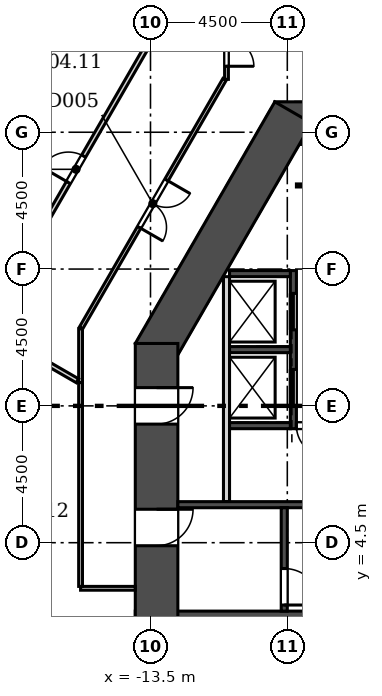
"""IFC4 building model, lengths in metres.
Left out: names, types, materials, properties, quantities, classifications, styles, units other than length and angle.
Written with IfcOpenShell. Run it as: python <this file> out.ifc"""

import sys

from ifc_helpers import new_model, si_unit, direction, frame, frame_2d, origin, place, context, subcontext, project, spatial, rectangle, extrude, element, fill, save


model = new_model("IFC4")
c1 = context("Model", 3, precision=1e-05, world=origin(), true_north=direction((0.0, 1.0)))
c2 = subcontext(c1, "Body", "Model", "MODEL_VIEW")
j1 = project(units=[si_unit("LENGTHUNIT", "METRE"), si_unit("PLANEANGLEUNIT", "RADIAN")], contexts=[c1])
p1 = place(None, origin())
s1 = spatial("IfcSite", under=j1, at=p1, CompositionType="ELEMENT")
p2 = place(p1, origin())
s2 = spatial("IfcBuilding", under=s1, at=p2, CompositionType="ELEMENT")
p3 = place(p2, frame((0.0, 0.0, 25.0)))
s3 = spatial("IfcBuildingStorey", under=s2, at=p3, CompositionType="ELEMENT", Elevation=25.0)
p4 = place(p3, frame((-14.0, 1.55, 0.0), z_axis=(0.0, 0.0, 1.0), x_axis=(1.0, 0.0, 0.0)))
e1 = element("IfcWall", 1, at=p4, inside=s3, PredefinedType="SHEAR", context=c2, shape_type="SweptSolid", body=[
    extrude(rectangle(XDim=28.0, YDim=1.4, at=frame_2d((14.0, 0.0))), origin(), (0.0, 0.0, 1.0), 4.5),
])
p5 = place(p3, frame((9.412, 18.3, 0.0), z_axis=(0.0, 0.0, 1.0), x_axis=(-1.0, 0.0, 0.0)))
e2 = element("IfcWall", 2, at=p5, inside=s3, PredefinedType="SHEAR", context=c2, shape_type="SweptSolid", body=[
    extrude(rectangle(XDim=18.823, YDim=1.4, at=frame_2d((9.412, 0.0))), origin(), (0.0, 0.0, 1.0), 4.5),
])
p6 = place(p5, frame((8.711, 0.0, 0.0)))
e3 = element("IfcOpeningElement", 3, at=p6, cuts=e2, PredefinedType="OPENING", context=c2, shape_type="SweptSolid", body=[
    extrude(rectangle(XDim=1.4, YDim=2.1, at=frame_2d((0.7, 1.05))), frame((0.0, 0.71, 0.0), z_axis=(0.0, -1.0, 0.0), x_axis=(1.0, 0.0, 0.0)), (0.0, 0.0, 1.0), 1.42),
])
p7 = place(p5, frame((11.412, 0.0, 0.0)))
e4 = element("IfcOpeningElement", 4, at=p7, cuts=e2, PredefinedType="OPENING", context=c2, shape_type="SweptSolid", body=[
    extrude(rectangle(XDim=6.0, YDim=2.4, at=frame_2d((3.0, 1.2))), frame((0.0, 0.71, 0.0), z_axis=(0.0, -1.0, 0.0), x_axis=(1.0, 0.0, 0.0)), (0.0, 0.0, 1.0), 1.42),
])
p8 = place(p5, frame((1.412, 0.0, 0.0)))
e5 = element("IfcOpeningElement", 5, at=p8, cuts=e2, PredefinedType="OPENING", context=c2, shape_type="SweptSolid", body=[
    extrude(rectangle(XDim=6.0, YDim=2.4, at=frame_2d((3.0, 1.2))), frame((0.0, 0.71, 0.0), z_axis=(0.0, -1.0, 0.0), x_axis=(1.0, 0.0, 0.0)), (0.0, 0.0, 1.0), 1.42),
])
p9 = place(p3, frame((-8.805, 18.65, 0.0), z_axis=(0.0, 0.0, 1.0), x_axis=(-0.50000187635, -0.866024320471, 0.0)))
e6 = element("IfcWall", 6, at=p9, inside=s3, PredefinedType="SHEAR", context=c2, shape_type="SweptSolid", body=[
    extrude(rectangle(XDim=9.177, YDim=1.4, at=frame_2d((4.588, 0.0))), origin(), (0.0, 0.0, 1.0), 4.5),
])
p10 = place(p3, frame((-13.3, 11.052, 0.0), z_axis=(0.0, 0.0, 1.0), x_axis=(0.0, -1.0, 0.0)))
e7 = element("IfcWall", 7, at=p10, inside=s3, PredefinedType="SHEAR", context=c2, shape_type="SweptSolid", body=[
    extrude(rectangle(XDim=10.202, YDim=1.4, at=frame_2d((5.101, 0.0))), origin(), (0.0, 0.0, 1.0), 4.5),
])
p11 = place(p10, frame((5.453, 0.0, 0.0)))
e8 = element("IfcOpeningElement", 8, at=p11, cuts=e7, PredefinedType="OPENING", context=c2, shape_type="SweptSolid", body=[
    extrude(rectangle(XDim=1.2, YDim=2.1, at=frame_2d((0.6, 1.05))), frame((0.0, 0.71, 0.0), z_axis=(0.0, -1.0, 0.0), x_axis=(1.0, 0.0, 0.0)), (0.0, 0.0, 1.0), 1.42),
])
p12 = place(p10, frame((1.453, 0.0, 0.0)))
e9 = element("IfcOpeningElement", 9, at=p12, cuts=e7, PredefinedType="OPENING", context=c2, shape_type="SweptSolid", body=[
    extrude(rectangle(XDim=1.2, YDim=2.1, at=frame_2d((0.6, 1.05))), frame((0.0, 0.71, 0.0), z_axis=(0.0, -1.0, 0.0), x_axis=(1.0, 0.0, 0.0)), (0.0, 0.0, 1.0), 1.42),
])
p13 = place(p3, frame((-4.353, 56.207, 0.0), z_axis=(0.0, 0.0, 1.0), x_axis=(-0.500000836325, -0.866024920931, 0.0)))
e10 = element("IfcWall", 10, at=p13, inside=s3, PredefinedType="SOLIDWALL", context=c2, shape_type="SweptSolid", body=[
    extrude(rectangle(XDim=56.0, YDim=0.34, at=frame_2d((28.0, 0.0))), origin(), (0.0, 0.0, 1.0), 4.2),
])
p14 = place(p13, frame((1.5, 0.0, 0.9)))
e11 = element("IfcOpeningElement", 11, at=p14, cuts=e10, PredefinedType="OPENING", context=c2, shape_type="SweptSolid", body=[
    extrude(rectangle(XDim=1.885, YDim=3.0, at=frame_2d((0.942, 1.5))), frame((0.0, 0.18, 0.0), z_axis=(0.0, -1.0, 0.0), x_axis=(1.0, 0.0, 0.0)), (0.0, 0.0, 1.0), 0.36),
])
p15 = place(p13, frame((4.5, 0.0, 0.9)))
e12 = element("IfcOpeningElement", 12, at=p15, cuts=e10, PredefinedType="OPENING", context=c2, shape_type="SweptSolid", body=[
    extrude(rectangle(XDim=1.885, YDim=3.0, at=frame_2d((0.942, 1.5))), frame((0.0, 0.18, 0.0), z_axis=(0.0, -1.0, 0.0), x_axis=(1.0, 0.0, 0.0)), (0.0, 0.0, 1.0), 0.36),
])
p16 = place(p13, frame((7.5, 0.0, 0.9)))
e13 = element("IfcOpeningElement", 13, at=p16, cuts=e10, PredefinedType="OPENING", context=c2, shape_type="SweptSolid", body=[
    extrude(rectangle(XDim=1.885, YDim=3.0, at=frame_2d((0.942, 1.5))), frame((0.0, 0.18, 0.0), z_axis=(0.0, -1.0, 0.0), x_axis=(1.0, 0.0, 0.0)), (0.0, 0.0, 1.0), 0.36),
])
p17 = place(p13, frame((10.5, 0.0, 0.9)))
e14 = element("IfcOpeningElement", 14, at=p17, cuts=e10, PredefinedType="OPENING", context=c2, shape_type="SweptSolid", body=[
    extrude(rectangle(XDim=1.885, YDim=3.0, at=frame_2d((0.942, 1.5))), frame((0.0, 0.18, 0.0), z_axis=(0.0, -1.0, 0.0), x_axis=(1.0, 0.0, 0.0)), (0.0, 0.0, 1.0), 0.36),
])
p18 = place(p13, frame((13.5, 0.0, 0.9)))
e15 = element("IfcOpeningElement", 15, at=p18, cuts=e10, PredefinedType="OPENING", context=c2, shape_type="SweptSolid", body=[
    extrude(rectangle(XDim=1.885, YDim=3.0, at=frame_2d((0.942, 1.5))), frame((0.0, 0.18, 0.0), z_axis=(0.0, -1.0, 0.0), x_axis=(1.0, 0.0, 0.0)), (0.0, 0.0, 1.0), 0.36),
])
p19 = place(p13, frame((16.5, 0.0, 0.9)))
e16 = element("IfcOpeningElement", 16, at=p19, cuts=e10, PredefinedType="OPENING", context=c2, shape_type="SweptSolid", body=[
    extrude(rectangle(XDim=1.885, YDim=3.0, at=frame_2d((0.942, 1.5))), frame((0.0, 0.18, 0.0), z_axis=(0.0, -1.0, 0.0), x_axis=(1.0, 0.0, 0.0)), (0.0, 0.0, 1.0), 0.36),
])
p20 = place(p13, frame((19.5, 0.0, 0.9)))
e17 = element("IfcOpeningElement", 17, at=p20, cuts=e10, PredefinedType="OPENING", context=c2, shape_type="SweptSolid", body=[
    extrude(rectangle(XDim=1.885, YDim=3.0, at=frame_2d((0.942, 1.5))), frame((0.0, 0.18, 0.0), z_axis=(0.0, -1.0, 0.0), x_axis=(1.0, 0.0, 0.0)), (0.0, 0.0, 1.0), 0.36),
])
p21 = place(p13, frame((22.5, 0.0, 0.9)))
e18 = element("IfcOpeningElement", 18, at=p21, cuts=e10, PredefinedType="OPENING", context=c2, shape_type="SweptSolid", body=[
    extrude(rectangle(XDim=1.885, YDim=3.0, at=frame_2d((0.942, 1.5))), frame((0.0, 0.18, 0.0), z_axis=(0.0, -1.0, 0.0), x_axis=(1.0, 0.0, 0.0)), (0.0, 0.0, 1.0), 0.36),
])
p22 = place(p13, frame((25.5, 0.0, 0.0)))
e19 = element("IfcOpeningElement", 19, at=p22, cuts=e10, PredefinedType="OPENING", context=c2, shape_type="SweptSolid", body=[
    extrude(rectangle(XDim=1.885, YDim=2.6, at=frame_2d((0.942, 1.3))), frame((0.0, 0.18, 0.0), z_axis=(0.0, -1.0, 0.0), x_axis=(1.0, 0.0, 0.0)), (0.0, 0.0, 1.0), 0.36),
])
p23 = place(p13, frame((28.5, 0.0, 0.9)))
e20 = element("IfcOpeningElement", 20, at=p23, cuts=e10, PredefinedType="OPENING", context=c2, shape_type="SweptSolid", body=[
    extrude(rectangle(XDim=1.885, YDim=3.0, at=frame_2d((0.942, 1.5))), frame((0.0, 0.18, 0.0), z_axis=(0.0, -1.0, 0.0), x_axis=(1.0, 0.0, 0.0)), (0.0, 0.0, 1.0), 0.36),
])
p24 = place(p13, frame((31.5, 0.0, 0.9)))
e21 = element("IfcOpeningElement", 21, at=p24, cuts=e10, PredefinedType="OPENING", context=c2, shape_type="SweptSolid", body=[
    extrude(rectangle(XDim=1.885, YDim=3.0, at=frame_2d((0.942, 1.5))), frame((0.0, 0.18, 0.0), z_axis=(0.0, -1.0, 0.0), x_axis=(1.0, 0.0, 0.0)), (0.0, 0.0, 1.0), 0.36),
])
p25 = place(p13, frame((34.5, 0.0, 0.9)))
e22 = element("IfcOpeningElement", 22, at=p25, cuts=e10, PredefinedType="OPENING", context=c2, shape_type="SweptSolid", body=[
    extrude(rectangle(XDim=1.885, YDim=3.0, at=frame_2d((0.942, 1.5))), frame((0.0, 0.18, 0.0), z_axis=(0.0, -1.0, 0.0), x_axis=(1.0, 0.0, 0.0)), (0.0, 0.0, 1.0), 0.36),
])
p26 = place(p13, frame((37.5, 0.0, 0.9)))
e23 = element("IfcOpeningElement", 23, at=p26, cuts=e10, PredefinedType="OPENING", context=c2, shape_type="SweptSolid", body=[
    extrude(rectangle(XDim=1.885, YDim=3.0, at=frame_2d((0.942, 1.5))), frame((0.0, 0.18, 0.0), z_axis=(0.0, -1.0, 0.0), x_axis=(1.0, 0.0, 0.0)), (0.0, 0.0, 1.0), 0.36),
])
p27 = place(p13, frame((40.5, 0.0, 0.9)))
e24 = element("IfcOpeningElement", 24, at=p27, cuts=e10, PredefinedType="OPENING", context=c2, shape_type="SweptSolid", body=[
    extrude(rectangle(XDim=1.885, YDim=3.0, at=frame_2d((0.942, 1.5))), frame((0.0, 0.18, 0.0), z_axis=(0.0, -1.0, 0.0), x_axis=(1.0, 0.0, 0.0)), (0.0, 0.0, 1.0), 0.36),
])
p28 = place(p13, frame((43.5, 0.0, 0.9)))
e25 = element("IfcOpeningElement", 25, at=p28, cuts=e10, PredefinedType="OPENING", context=c2, shape_type="SweptSolid", body=[
    extrude(rectangle(XDim=1.885, YDim=3.0, at=frame_2d((0.942, 1.5))), frame((0.0, 0.18, 0.0), z_axis=(0.0, -1.0, 0.0), x_axis=(1.0, 0.0, 0.0)), (0.0, 0.0, 1.0), 0.36),
])
p29 = place(p13, frame((46.5, 0.0, 0.9)))
e26 = element("IfcOpeningElement", 26, at=p29, cuts=e10, PredefinedType="OPENING", context=c2, shape_type="SweptSolid", body=[
    extrude(rectangle(XDim=1.885, YDim=3.0, at=frame_2d((0.942, 1.5))), frame((0.0, 0.18, 0.0), z_axis=(0.0, -1.0, 0.0), x_axis=(1.0, 0.0, 0.0)), (0.0, 0.0, 1.0), 0.36),
])
p30 = place(p13, frame((49.5, 0.0, 0.9)))
e27 = element("IfcOpeningElement", 27, at=p30, cuts=e10, PredefinedType="OPENING", context=c2, shape_type="SweptSolid", body=[
    extrude(rectangle(XDim=1.885, YDim=3.0, at=frame_2d((0.942, 1.5))), frame((0.0, 0.18, 0.0), z_axis=(0.0, -1.0, 0.0), x_axis=(1.0, 0.0, 0.0)), (0.0, 0.0, 1.0), 0.36),
])
p31 = place(p13, frame((52.5, 0.0, 0.9)))
e28 = element("IfcOpeningElement", 28, at=p31, cuts=e10, PredefinedType="OPENING", context=c2, shape_type="SweptSolid", body=[
    extrude(rectangle(XDim=1.885, YDim=3.0, at=frame_2d((0.942, 1.5))), frame((0.0, 0.18, 0.0), z_axis=(0.0, -1.0, 0.0), x_axis=(1.0, 0.0, 0.0)), (0.0, 0.0, 1.0), 0.36),
])
p32 = place(p3, frame((-11.0, 5.85, 0.0), z_axis=(0.0, 0.0, 1.0), x_axis=(0.0, 1.0, 0.0)))
e29 = element("IfcWall", 29, at=p32, inside=s3, PredefinedType="SOLIDWALL", context=c2, shape_type="SweptSolid", body=[
    extrude(rectangle(XDim=7.4, YDim=0.2, at=frame_2d((3.7, 0.0))), origin(), (0.0, 0.0, 1.0), 4.2),
])
p33 = place(p3, frame((-8.8, 8.25, -2.0), z_axis=(0.0, 0.0, 1.0), x_axis=(0.0, 1.0, 0.0)))
e30 = element("IfcWall", 30, at=p33, inside=s3, PredefinedType="SOLIDWALL", context=c2, shape_type="SweptSolid", body=[
    extrude(rectangle(XDim=5.2, YDim=0.2, at=frame_2d((2.6, 0.0))), origin(), (0.0, 0.0, 1.0), 6.2),
])
p34 = place(p33, frame((0.75, 0.0, 2.0)))
e31 = element("IfcOpeningElement", 31, at=p34, cuts=e30, PredefinedType="OPENING", context=c2, shape_type="SweptSolid", body=[
    extrude(rectangle(XDim=1.2, YDim=2.1, at=frame_2d((0.6, 1.05))), frame((0.0, 0.11, 0.0), z_axis=(0.0, -1.0, 0.0), x_axis=(1.0, 0.0, 0.0)), (0.0, 0.0, 1.0), 0.22),
])
p35 = place(p33, frame((3.25, 0.0, 2.0)))
e32 = element("IfcOpeningElement", 32, at=p35, cuts=e30, PredefinedType="OPENING", context=c2, shape_type="SweptSolid", body=[
    extrude(rectangle(XDim=1.2, YDim=2.1, at=frame_2d((0.6, 1.05))), frame((0.0, 0.11, 0.0), z_axis=(0.0, -1.0, 0.0), x_axis=(1.0, 0.0, 0.0)), (0.0, 0.0, 1.0), 0.22),
])
p36 = place(p3, frame((-10.9, 8.35, -2.0), z_axis=(0.0, 0.0, 1.0), x_axis=(1.0, 0.0, 0.0)))
e33 = element("IfcWall", 33, at=p36, inside=s3, PredefinedType="SOLIDWALL", context=c2, shape_type="SweptSolid", body=[
    extrude(rectangle(XDim=2.0, YDim=0.2, at=frame_2d((1.0, 0.0))), origin(), (0.0, 0.0, 1.0), 6.2),
])
p37 = place(p3, frame((-12.6, 5.75, -2.0), z_axis=(0.0, 0.0, 1.0), x_axis=(1.0, 0.0, 0.0)))
e34 = element("IfcWall", 34, at=p37, inside=s3, PredefinedType="SOLIDWALL", context=c2, shape_type="SweptSolid", body=[
    extrude(rectangle(XDim=11.4, YDim=0.2, at=frame_2d((5.7, 0.0))), origin(), (0.0, 0.0, 1.0), 6.2),
])
p38 = place(p3, frame((-9.1, 2.25, -2.0), z_axis=(0.0, 0.0, 1.0), x_axis=(0.0, 1.0, 0.0)))
e35 = element("IfcWall", 35, at=p38, inside=s3, PredefinedType="SOLIDWALL", context=c2, shape_type="SweptSolid", body=[
    extrude(rectangle(XDim=3.4, YDim=0.2, at=frame_2d((1.7, 0.0))), origin(), (0.0, 0.0, 1.0), 6.2),
])
p39 = place(p38, frame((0.2, 0.0, 2.0)))
e36 = element("IfcOpeningElement", 36, at=p39, cuts=e35, PredefinedType="OPENING", context=c2, shape_type="SweptSolid", body=[
    extrude(rectangle(XDim=1.2, YDim=2.1, at=frame_2d((0.6, 1.05))), frame((0.0, 0.11, 0.0), z_axis=(0.0, -1.0, 0.0), x_axis=(1.0, 0.0, 0.0)), (0.0, 0.0, 1.0), 0.22),
])
for number, where, z_axis, x_axis in (
    (37, (-10.9, 10.85, -2.0), (0.0, 0.0, 1.0), (1.0, 0.0, 0.0)),
    (38, (-10.9, 13.35, -2.0), (0.0, 0.0, 1.0), (1.0, 0.0, 0.0)),
):
    element("IfcWall", number, at=place(p3, frame(where, z_axis=z_axis, x_axis=x_axis)), inside=s3, PredefinedType="SOLIDWALL", context=c2, shape_type="SweptSolid", body=[
        extrude(rectangle(XDim=2.0, YDim=0.2, at=frame_2d((1.0, 0.0))), origin(), (0.0, 0.0, 1.0), 6.2),
    ])
p40 = place(p3, frame((-8.7, 16.25, 0.0), z_axis=(0.0, 0.0, 1.0), x_axis=(1.0, 0.0, 0.0)))
e39 = element("IfcWall", 39, at=p40, inside=s3, PredefinedType="PARTITIONING", context=c2, shape_type="SweptSolid", body=[
    extrude(rectangle(XDim=2.8, YDim=0.1, at=frame_2d((1.4, 0.0))), origin(), (0.0, 0.0, 1.0), 4.2),
])
p41 = place(p40, frame((0.7, 0.0, 0.0)))
e40 = element("IfcOpeningElement", 40, at=p41, cuts=e39, PredefinedType="OPENING", context=c2, shape_type="SweptSolid", body=[
    extrude(rectangle(XDim=1.4, YDim=2.1, at=frame_2d((0.7, 1.05))), frame((0.0, 0.06, 0.0), z_axis=(0.0, -1.0, 0.0), x_axis=(1.0, 0.0, 0.0)), (0.0, 0.0, 1.0), 0.12),
])
p42 = place(p3, frame((-8.7, 8.35, 0.0), z_axis=(0.0, 0.0, 1.0), x_axis=(1.0, 0.0, 0.0)))
e41 = element("IfcWall", 41, at=p42, inside=s3, PredefinedType="SOLIDWALL", context=c2, shape_type="SweptSolid", body=[
    extrude(rectangle(XDim=2.8, YDim=0.2, at=frame_2d((1.4, 0.0))), origin(), (0.0, 0.0, 1.0), 4.2),
])
p43 = place(p42, origin())
e42 = element("IfcOpeningElement", 42, at=p43, cuts=e41, PredefinedType="OPENING", context=c2, shape_type="SweptSolid", body=[
    extrude(rectangle(XDim=1.0, YDim=2.1, at=frame_2d((0.5, 1.05))), frame((0.0, 0.11, 0.0), z_axis=(0.0, -1.0, 0.0), x_axis=(1.0, 0.0, 0.0)), (0.0, 0.0, 1.0), 0.22),
])
p44 = place(p3, frame((-11.0, 19.74, 0.0), z_axis=(0.0, 0.0, 1.0), x_axis=(0.0, 1.0, 0.0)))
e43 = element("IfcWall", 43, at=p44, inside=s3, PredefinedType="PARTITIONING", context=c2, shape_type="SweptSolid", body=[
    extrude(rectangle(XDim=2.66, YDim=0.125, at=frame_2d((1.33, 0.0))), origin(), (0.0, 0.0, 1.0), 4.2),
])
p45 = place(p44, frame((0.43, 0.0, 0.0)))
e44 = element("IfcOpeningElement", 44, at=p45, cuts=e43, PredefinedType="OPENING", context=c2, shape_type="SweptSolid", body=[
    extrude(rectangle(XDim=1.8, YDim=2.1, at=frame_2d((0.9, 1.05))), frame((0.0, 0.073, 0.0), z_axis=(0.0, -1.0, 0.0), x_axis=(1.0, 0.0, 0.0)), (0.0, 0.0, 1.0), 0.145),
])
p46 = place(p3, frame((-15.8, 9.766, 0.0), z_axis=(0.0, 0.0, 1.0), x_axis=(0.0, 1.0, 0.0)))
e45 = element("IfcWall", 45, at=p46, inside=s3, PredefinedType="PARTITIONING", context=c2, shape_type="SweptSolid", body=[
    extrude(rectangle(XDim=1.769, YDim=0.125, at=frame_2d((0.885, 0.0))), origin(), (0.0, 0.0, 1.0), 4.2),
])
p47 = place(p3, frame((-15.784, 11.562, 0.0), z_axis=(0.0, 0.0, 1.0), x_axis=(0.500006656899, 0.866021560388, 0.0)))
e46 = element("IfcWall", 46, at=p47, inside=s3, PredefinedType="PARTITIONING", context=c2, shape_type="SweptSolid", body=[
    extrude(rectangle(XDim=9.444, YDim=0.125, at=frame_2d((4.722, 0.0))), origin(), (0.0, 0.0, 1.0), 4.2),
])
p48 = place(p47, frame((3.822, 0.0, 0.0)))
e47 = element("IfcOpeningElement", 47, at=p48, cuts=e46, PredefinedType="OPENING", context=c2, shape_type="SweptSolid", body=[
    extrude(rectangle(XDim=1.8, YDim=2.1, at=frame_2d((0.9, 1.05))), frame((0.0, 0.073, 0.0), z_axis=(0.0, -1.0, 0.0), x_axis=(1.0, 0.0, 0.0)), (0.0, 0.0, 1.0), 0.145),
])
p49 = place(p3, frame((-14.0, 3.0, 0.0), z_axis=(0.0, 0.0, 1.0), x_axis=(-1.0, 0.0, 0.0)))
e48 = element("IfcWall", 48, at=p49, inside=s3, PredefinedType="PARTITIONING", context=c2, shape_type="SweptSolid", body=[
    extrude(rectangle(XDim=1.8, YDim=0.125, at=frame_2d((0.9, 0.0))), origin(), (0.0, 0.0, 1.0), 4.2),
])
p50 = place(p3, frame((-15.8, 3.062, 0.0), z_axis=(0.0, 0.0, 1.0), x_axis=(0.0, 1.0, 0.0)))
e49 = element("IfcWall", 49, at=p50, inside=s3, PredefinedType="PARTITIONING", context=c2, shape_type="SweptSolid", body=[
    extrude(rectangle(XDim=6.703, YDim=0.125, at=frame_2d((3.352, 0.0))), origin(), (0.0, 0.0, 1.0), 4.2),
])
p51 = place(p3, frame((-18.912, 11.649, 0.0), z_axis=(0.0, 0.0, 1.0), x_axis=(0.500010179592, 0.866019526514, 0.0)))
e50 = element("IfcWall", 50, at=p51, inside=s3, PredefinedType="PARTITIONING", context=c2, shape_type="SweptSolid", body=[
    extrude(rectangle(XDim=11.85, YDim=0.15, at=frame_2d((5.925, 0.0))), origin(), (0.0, 0.0, 1.0), 4.2),
])
p52 = place(p51, frame((5.425, 0.0, 0.0)))
e51 = element("IfcOpeningElement", 51, at=p52, cuts=e50, PredefinedType="OPENING", context=c2, shape_type="SweptSolid", body=[
    extrude(rectangle(XDim=1.0, YDim=2.1, at=frame_2d((0.5, 1.05))), frame((0.0, 0.085, 0.0), z_axis=(0.0, -1.0, 0.0), x_axis=(1.0, 0.0, 0.0)), (0.0, 0.0, 1.0), 0.17),
])
p53 = place(p3, frame((-15.9, 9.824, 0.0), z_axis=(0.0, 0.0, 1.0), x_axis=(-0.866058575552, 0.499942540411, 0.0)))
e52 = element("IfcWall", 52, at=p53, inside=s3, PredefinedType="PARTITIONING", context=c2, shape_type="SweptSolid", body=[
    extrude(rectangle(XDim=3.521, YDim=0.15, at=frame_2d((1.76, 0.0))), origin(), (0.0, 0.0, 1.0), 4.2),
])
p54 = place(p53, frame((1.26, 0.0, 0.0)))
e53 = element("IfcOpeningElement", 53, at=p54, cuts=e52, PredefinedType="OPENING", context=c2, shape_type="SweptSolid", body=[
    extrude(rectangle(XDim=1.0, YDim=2.1, at=frame_2d((0.5, 1.05))), frame((0.0, 0.085, 0.0), z_axis=(0.0, -1.0, 0.0), x_axis=(1.0, 0.0, 0.0)), (0.0, 0.0, 1.0), 0.17),
])
p55 = place(p34, origin())
e54 = element("IfcDoor", 54, at=p55, inside=s3, OperationType="SLIDING_TO_LEFT", PredefinedType="DOOR", context=c2, shape_type="SweptSolid", body=[
    extrude(rectangle(XDim=1.2, YDim=2.1, at=frame_2d((0.6, 1.05))), frame((0.0, 0.025, 0.0), z_axis=(0.0, -1.0, 0.0), x_axis=(1.0, 0.0, 0.0)), (0.0, 0.0, 1.0), 0.05),
])
fill(e31, e54)
p56 = place(p35, origin())
e55 = element("IfcDoor", 55, at=p56, inside=s3, OperationType="SLIDING_TO_LEFT", PredefinedType="DOOR", context=c2, shape_type="SweptSolid", body=[
    extrude(rectangle(XDim=1.2, YDim=2.1, at=frame_2d((0.6, 1.05))), frame((0.0, 0.025, 0.0), z_axis=(0.0, -1.0, 0.0), x_axis=(1.0, 0.0, 0.0)), (0.0, 0.0, 1.0), 0.05),
])
fill(e32, e55)
p57 = place(p43, frame((1.0, 0.0, 0.0), z_axis=(0.0, 0.0, 1.0), x_axis=(-1.0, 0.0, 0.0)))
e56 = element("IfcDoor", 56, at=p57, inside=s3, OperationType="SINGLE_SWING_LEFT", PredefinedType="DOOR", context=c2, shape_type="SweptSolid", body=[
    extrude(rectangle(XDim=1.0, YDim=2.1, at=frame_2d((0.5, 1.05))), frame((0.0, 0.025, 0.0), z_axis=(0.0, -1.0, 0.0), x_axis=(1.0, 0.0, 0.0)), (0.0, 0.0, 1.0), 0.05),
])
fill(e42, e56)
p58 = place(p11, origin())
e57 = element("IfcDoor", 57, at=p58, inside=s3, OperationType="SINGLE_SWING_LEFT", PredefinedType="DOOR", context=c2, shape_type="SweptSolid", body=[
    extrude(rectangle(XDim=1.2, YDim=2.1, at=frame_2d((0.6, 1.05))), frame((0.0, 0.025, 0.0), z_axis=(0.0, -1.0, 0.0), x_axis=(1.0, 0.0, 0.0)), (0.0, 0.0, 1.0), 0.05),
])
fill(e8, e57)
p59 = place(p39, frame((1.2, 0.0, 0.0), z_axis=(0.0, 0.0, 1.0), x_axis=(-1.0, 0.0, 0.0)))
e58 = element("IfcDoor", 58, at=p59, inside=s3, OperationType="SINGLE_SWING_RIGHT", PredefinedType="DOOR", context=c2, shape_type="SweptSolid", body=[
    extrude(rectangle(XDim=1.2, YDim=2.1, at=frame_2d((0.6, 1.05))), frame((0.0, 0.025, 0.0), z_axis=(0.0, -1.0, 0.0), x_axis=(1.0, 0.0, 0.0)), (0.0, 0.0, 1.0), 0.05),
])
fill(e36, e58)
p60 = place(p12, origin())
e59 = element("IfcDoor", 59, at=p60, inside=s3, OperationType="SINGLE_SWING_LEFT", PredefinedType="DOOR", context=c2, shape_type="SweptSolid", body=[
    extrude(rectangle(XDim=1.2, YDim=2.1, at=frame_2d((0.6, 1.05))), frame((0.0, 0.025, 0.0), z_axis=(0.0, -1.0, 0.0), x_axis=(1.0, 0.0, 0.0)), (0.0, 0.0, 1.0), 0.05),
])
fill(e9, e59)
p61 = place(p45, frame((1.8, 0.0, 0.0), z_axis=(0.0, 0.0, 1.0), x_axis=(-1.0, 0.0, 0.0)))
e60 = element("IfcDoor", 60, at=p61, inside=s3, OperationType="DOUBLE_DOOR_SINGLE_SWING", PredefinedType="DOOR", context=c2, shape_type="SweptSolid", body=[
    extrude(rectangle(XDim=1.8, YDim=2.1, at=frame_2d((0.9, 1.05))), frame((0.0, 0.025, 0.0), z_axis=(0.0, -1.0, 0.0), x_axis=(1.0, 0.0, 0.0)), (0.0, 0.0, 1.0), 0.05),
])
fill(e44, e60)
p62 = place(p48, frame((1.8, 0.0, 0.0), z_axis=(0.0, 0.0, 1.0), x_axis=(-1.0, 0.0, 0.0)))
e61 = element("IfcDoor", 61, at=p62, inside=s3, OperationType="DOUBLE_DOOR_SINGLE_SWING", PredefinedType="DOOR", context=c2, shape_type="SweptSolid", body=[
    extrude(rectangle(XDim=1.8, YDim=2.1, at=frame_2d((0.9, 1.05))), frame((0.0, 0.025, 0.0), z_axis=(0.0, -1.0, 0.0), x_axis=(1.0, 0.0, 0.0)), (0.0, 0.0, 1.0), 0.05),
])
fill(e47, e61)
p63 = place(p52, origin())
e62 = element("IfcDoor", 62, at=p63, inside=s3, OperationType="SINGLE_SWING_LEFT", PredefinedType="DOOR", context=c2, shape_type="SweptSolid", body=[
    extrude(rectangle(XDim=1.0, YDim=2.1, at=frame_2d((0.5, 1.05))), frame((0.0, 0.025, 0.0), z_axis=(0.0, -1.0, 0.0), x_axis=(1.0, 0.0, 0.0)), (0.0, 0.0, 1.0), 0.05),
])
fill(e51, e62)
save(model, sys.argv[1])
